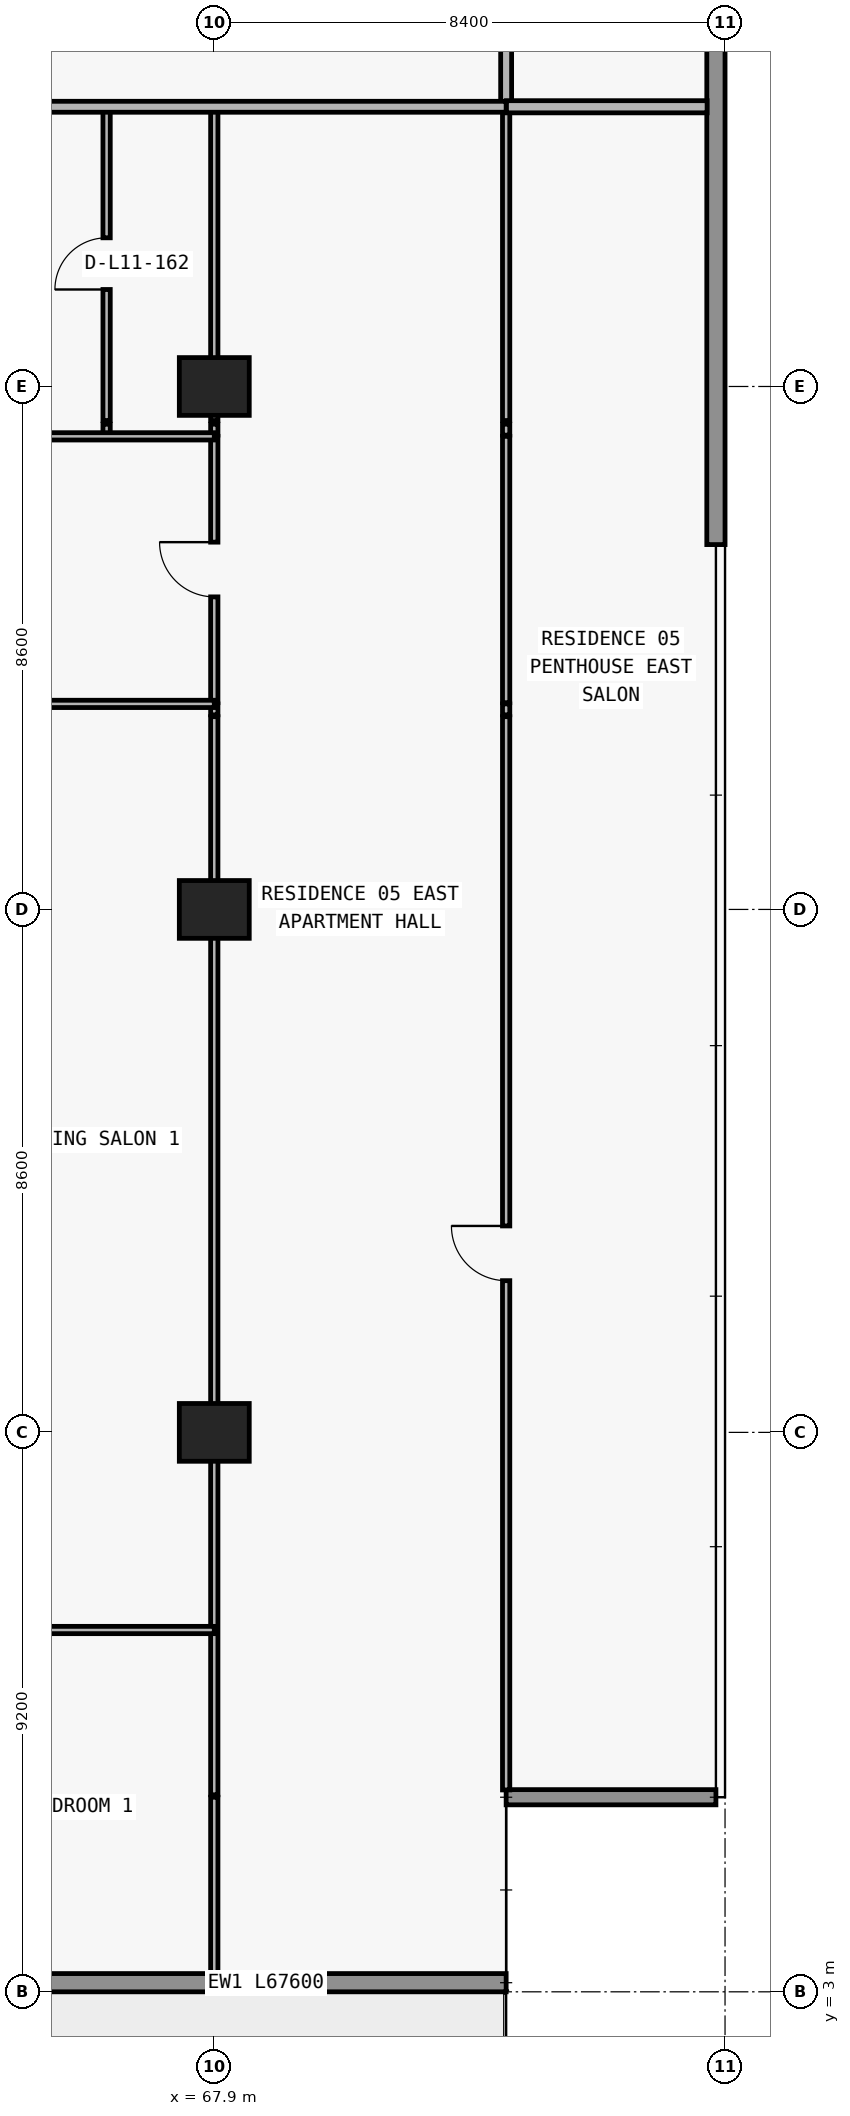
"""IFC4 building model, lengths in metres.
Left out: names, types, materials, properties, quantities, classifications, styles, units other than length and angle.
Written with IfcOpenShell. Run it as: python <this file> out.ifc"""

import sys

from ifc_helpers import new_model, si_unit, direction, frame, frame_2d, origin, origin_2d, place, context, subcontext, project, spatial, rectangle, extrude, element, fill, save


model = new_model("IFC4")
c1 = context("Model", 3, precision=1e-05, world=origin(), true_north=direction((0.0, 1.0)))
c2 = subcontext(c1, "Body", "Model", "MODEL_VIEW")
j1 = project(units=[si_unit("LENGTHUNIT", "METRE"), si_unit("PLANEANGLEUNIT", "RADIAN")], contexts=[c1])
p1 = place(None, origin())
s1 = spatial("IfcSite", under=j1, at=p1, CompositionType="ELEMENT")
p2 = place(p1, origin())
s2 = spatial("IfcBuilding", under=s1, at=p2, CompositionType="ELEMENT")
p3 = place(p2, frame((0.0, 0.0, 46.5)))
s3 = spatial("IfcBuildingStorey", under=s2, at=p3, CompositionType="ELEMENT", Elevation=46.5)
for number, where, z_axis, x_axis in (
    (1, (67.9, 12.2, 0.0), (0.0, 0.0, 1.0), (1.0, 0.0, 0.0)),
    (2, (67.9, 20.8, 0.0), (0.0, 0.0, 1.0), (1.0, 0.0, 0.0)),
    (3, (67.9, 29.4, 0.0), (0.0, 0.0, 1.0), (1.0, 0.0, 0.0)),
):
    element("IfcColumn", number, at=place(p3, frame(where, z_axis=z_axis, x_axis=x_axis)), inside=s3, PredefinedType="COLUMN", context=c2, shape_type="SweptSolid", body=[
        extrude(rectangle(XDim=1.15, YDim=0.95, at=origin_2d()), origin(), (0.0, 0.0, 1.0), 3.05),
    ])
p4 = place(p3, frame((72.7, 3.15, 0.0), z_axis=(0.0, 0.0, 1.0), x_axis=(-1.0, 0.0, 0.0)))
e4 = element("IfcWall", 4, at=p4, inside=s3, PredefinedType="STANDARD", context=c2, shape_type="SweptSolid", body=[
    extrude(rectangle(XDim=67.6, YDim=0.3, at=frame_2d((33.8, 0.0))), origin(), (0.0, 0.0, 1.0), 3.05),
])
p5 = place(p4, frame((59.89, 0.0, 0.0)))
e5 = element("IfcOpeningElement", 5, at=p5, cuts=e4, PredefinedType="OPENING", context=c2, shape_type="SweptSolid", body=[
    extrude(rectangle(XDim=2.0, YDim=2.3, at=frame_2d((1.0, 1.15))), frame((0.0, 0.16, 0.0), z_axis=(0.0, -1.0, 0.0), x_axis=(1.0, 0.0, 0.0)), (0.0, 0.0, 1.0), 0.32),
])
p6 = place(p4, frame((55.21, 0.0, 0.65)))
e6 = element("IfcOpeningElement", 6, at=p6, cuts=e4, PredefinedType="OPENING", context=c2, shape_type="SweptSolid", body=[
    extrude(rectangle(XDim=2.6, YDim=1.85, at=frame_2d((1.3, 0.925))), frame((0.0, 0.16, 0.0), z_axis=(0.0, -1.0, 0.0), x_axis=(1.0, 0.0, 0.0)), (0.0, 0.0, 1.0), 0.32),
])
p7 = place(p4, frame((49.1, 0.0, 0.85)))
e7 = element("IfcOpeningElement", 7, at=p7, cuts=e4, PredefinedType="OPENING", context=c2, shape_type="SweptSolid", body=[
    extrude(rectangle(XDim=2.2, YDim=1.55, at=frame_2d((1.1, 0.775))), frame((0.0, 0.16, 0.0), z_axis=(0.0, -1.0, 0.0), x_axis=(1.0, 0.0, 0.0)), (0.0, 0.0, 1.0), 0.32),
])
p8 = place(p4, frame((42.69, 0.0, 0.0)))
e8 = element("IfcOpeningElement", 8, at=p8, cuts=e4, PredefinedType="OPENING", context=c2, shape_type="SweptSolid", body=[
    extrude(rectangle(XDim=2.0, YDim=2.3, at=frame_2d((1.0, 1.15))), frame((0.0, 0.16, 0.0), z_axis=(0.0, -1.0, 0.0), x_axis=(1.0, 0.0, 0.0)), (0.0, 0.0, 1.0), 0.32),
])
p9 = place(p4, frame((38.59, 0.0, 0.85)))
e9 = element("IfcOpeningElement", 9, at=p9, cuts=e4, PredefinedType="OPENING", context=c2, shape_type="SweptSolid", body=[
    extrude(rectangle(XDim=1.8, YDim=1.55, at=frame_2d((0.9, 0.775))), frame((0.0, 0.16, 0.0), z_axis=(0.0, -1.0, 0.0), x_axis=(1.0, 0.0, 0.0)), (0.0, 0.0, 1.0), 0.32),
])
p10 = place(p4, frame((30.914, 0.0, 0.85)))
e10 = element("IfcOpeningElement", 10, at=p10, cuts=e4, PredefinedType="OPENING", context=c2, shape_type="SweptSolid", body=[
    extrude(rectangle(XDim=2.2, YDim=1.55, at=frame_2d((1.1, 0.775))), frame((0.0, 0.16, 0.0), z_axis=(0.0, -1.0, 0.0), x_axis=(1.0, 0.0, 0.0)), (0.0, 0.0, 1.0), 0.32),
])
p11 = place(p4, frame((26.69, 0.0, 0.0)))
e11 = element("IfcOpeningElement", 11, at=p11, cuts=e4, PredefinedType="OPENING", context=c2, shape_type="SweptSolid", body=[
    extrude(rectangle(XDim=2.0, YDim=2.3, at=frame_2d((1.0, 1.15))), frame((0.0, 0.16, 0.0), z_axis=(0.0, -1.0, 0.0), x_axis=(1.0, 0.0, 0.0)), (0.0, 0.0, 1.0), 0.32),
])
p12 = place(p4, frame((22.59, 0.0, 0.85)))
e12 = element("IfcOpeningElement", 12, at=p12, cuts=e4, PredefinedType="OPENING", context=c2, shape_type="SweptSolid", body=[
    extrude(rectangle(XDim=1.8, YDim=1.55, at=frame_2d((0.9, 0.775))), frame((0.0, 0.16, 0.0), z_axis=(0.0, -1.0, 0.0), x_axis=(1.0, 0.0, 0.0)), (0.0, 0.0, 1.0), 0.32),
])
p13 = place(p4, frame((18.69, 0.0, 0.0)))
e13 = element("IfcOpeningElement", 13, at=p13, cuts=e4, PredefinedType="OPENING", context=c2, shape_type="SweptSolid", body=[
    extrude(rectangle(XDim=2.0, YDim=2.3, at=frame_2d((1.0, 1.15))), frame((0.0, 0.16, 0.0), z_axis=(0.0, -1.0, 0.0), x_axis=(1.0, 0.0, 0.0)), (0.0, 0.0, 1.0), 0.32),
])
p14 = place(p4, frame((14.01, 0.0, 0.65)))
e14 = element("IfcOpeningElement", 14, at=p14, cuts=e4, PredefinedType="OPENING", context=c2, shape_type="SweptSolid", body=[
    extrude(rectangle(XDim=2.6, YDim=1.85, at=frame_2d((1.3, 0.925))), frame((0.0, 0.16, 0.0), z_axis=(0.0, -1.0, 0.0), x_axis=(1.0, 0.0, 0.0)), (0.0, 0.0, 1.0), 0.32),
])
p15 = place(p4, frame((7.9, 0.0, 0.85)))
e15 = element("IfcOpeningElement", 15, at=p15, cuts=e4, PredefinedType="OPENING", context=c2, shape_type="SweptSolid", body=[
    extrude(rectangle(XDim=2.2, YDim=1.55, at=frame_2d((1.1, 0.775))), frame((0.0, 0.16, 0.0), z_axis=(0.0, -1.0, 0.0), x_axis=(1.0, 0.0, 0.0)), (0.0, 0.0, 1.0), 0.32),
])
p16 = place(p3, frame((72.7, 6.2, 0.0), z_axis=(0.0, 0.0, 1.0), x_axis=(1.0, 0.0, 0.0)))
e16 = element("IfcWall", 16, at=p16, inside=s3, PredefinedType="ELEMENTEDWALL", context=c2, shape_type="SweptSolid", body=[
    extrude(rectangle(XDim=3.45, YDim=0.25, at=frame_2d((1.725, 0.0))), origin(), (0.0, 0.0, 1.0), 3.05),
])
p17 = place(p3, frame((76.15, 47.4, 0.0), z_axis=(0.0, 0.0, 1.0), x_axis=(0.0, -1.0, 0.0)))
e17 = element("IfcWall", 17, at=p17, inside=s3, PredefinedType="STANDARD", context=c2, shape_type="SweptSolid", body=[
    extrude(rectangle(XDim=20.6, YDim=0.3, at=frame_2d((10.3, 0.0))), origin(), (0.0, 0.0, 1.0), 3.05),
])
p18 = place(p3, frame((66.129, 28.6, 0.0), z_axis=(0.0, 0.0, 1.0), x_axis=(0.0, 1.0, 0.0)))
e18 = element("IfcWall", 18, at=p18, inside=s3, PredefinedType="PARTITIONING", context=c2, shape_type="SweptSolid", body=[
    extrude(rectangle(XDim=0.18, YDim=0.12, at=frame_2d((0.09, 0.0))), origin(), (0.0, 0.0, 1.0), 3.05),
])
p19 = place(p3, frame((66.129, 28.84, 0.0), z_axis=(0.0, 0.0, 1.0), x_axis=(0.0, 1.0, 0.0)))
e19 = element("IfcWall", 19, at=p19, inside=s3, PredefinedType="PARTITIONING", context=c2, shape_type="SweptSolid", body=[
    extrude(rectangle(XDim=5.16, YDim=0.12, at=frame_2d((2.58, 0.0))), origin(), (0.0, 0.0, 1.0), 3.05),
])
p20 = place(p19, frame((2.155, 0.0, 0.0)))
e20 = element("IfcOpeningElement", 20, at=p20, cuts=e19, PredefinedType="OPENING", context=c2, shape_type="SweptSolid", body=[
    extrude(rectangle(XDim=0.85, YDim=2.1, at=frame_2d((0.425, 1.05))), frame((0.0, 0.07, 0.0), z_axis=(0.0, -1.0, 0.0), x_axis=(1.0, 0.0, 0.0)), (0.0, 0.0, 1.0), 0.14),
])
p21 = place(p3, frame((67.9, 3.295, 0.0), z_axis=(0.0, 0.0, 1.0), x_axis=(0.0, 1.0, 0.0)))
e21 = element("IfcWall", 21, at=p21, inside=s3, PredefinedType="PARTITIONING", context=c2, shape_type="SweptSolid", body=[
    extrude(rectangle(XDim=2.905, YDim=0.12, at=frame_2d((1.453, 0.0))), origin(), (0.0, 0.0, 1.0), 3.05),
])
p22 = place(p3, frame((67.9, 6.24, 0.0), z_axis=(0.0, 0.0, 1.0), x_axis=(0.0, 1.0, 0.0)))
e22 = element("IfcWall", 22, at=p22, inside=s3, PredefinedType="PARTITIONING", context=c2, shape_type="SweptSolid", body=[
    extrude(rectangle(XDim=17.73, YDim=0.12, at=frame_2d((8.865, 0.0))), origin(), (0.0, 0.0, 1.0), 2.11),
])
p23 = place(p3, frame((67.9, 24.0, 0.0), z_axis=(0.0, 0.0, 1.0), x_axis=(0.0, 1.0, 0.0)))
e23 = element("IfcWall", 23, at=p23, inside=s3, PredefinedType="PARTITIONING", context=c2, shape_type="SweptSolid", body=[
    extrude(rectangle(XDim=0.18, YDim=0.12, at=frame_2d((0.09, 0.0))), origin(), (0.0, 0.0, 1.0), 2.11),
])
p24 = place(p3, frame((67.9, 24.2, 0.0), z_axis=(0.0, 0.0, 1.0), x_axis=(0.0, 1.0, 0.0)))
e24 = element("IfcWall", 24, at=p24, inside=s3, PredefinedType="PARTITIONING", context=c2, shape_type="SweptSolid", body=[
    extrude(rectangle(XDim=4.38, YDim=0.12, at=frame_2d((2.19, 0.0))), origin(), (0.0, 0.0, 1.0), 2.11),
])
p25 = place(p24, frame((1.74, 0.0, 0.0)))
e25 = element("IfcOpeningElement", 25, at=p25, cuts=e24, PredefinedType="OPENING", context=c2, shape_type="SweptSolid", body=[
    extrude(rectangle(XDim=0.9, YDim=2.06, at=frame_2d((0.45, 1.03))), frame((0.0, 0.07, 0.0), z_axis=(0.0, -1.0, 0.0), x_axis=(1.0, 0.0, 0.0)), (0.0, 0.0, 1.0), 0.14),
])
p26 = place(p3, frame((67.9, 28.6, 0.0), z_axis=(0.0, 0.0, 1.0), x_axis=(0.0, 1.0, 0.0)))
e26 = element("IfcWall", 26, at=p26, inside=s3, PredefinedType="PARTITIONING", context=c2, shape_type="SweptSolid", body=[
    extrude(rectangle(XDim=0.18, YDim=0.12, at=frame_2d((0.09, 0.0))), origin(), (0.0, 0.0, 1.0), 2.11),
])
p27 = place(p3, frame((67.9, 28.84, 0.0), z_axis=(0.0, 0.0, 1.0), x_axis=(0.0, 1.0, 0.0)))
e27 = element("IfcWall", 27, at=p27, inside=s3, PredefinedType="PARTITIONING", context=c2, shape_type="SweptSolid", body=[
    extrude(rectangle(XDim=5.16, YDim=0.12, at=frame_2d((2.58, 0.0))), origin(), (0.0, 0.0, 1.0), 2.11),
])
p28 = place(p3, frame((72.7, 6.32, 0.0), z_axis=(0.0, 0.0, 1.0), x_axis=(0.0, 1.0, 0.0)))
e28 = element("IfcWall", 28, at=p28, inside=s3, PredefinedType="PARTITIONING", context=c2, shape_type="SweptSolid", body=[
    extrude(rectangle(XDim=17.65, YDim=0.12, at=frame_2d((8.825, 0.0))), origin(), (0.0, 0.0, 1.0), 3.05),
])
p29 = place(p28, frame((8.375, 0.0, 0.0)))
e29 = element("IfcOpeningElement", 29, at=p29, cuts=e28, PredefinedType="OPENING", context=c2, shape_type="SweptSolid", body=[
    extrude(rectangle(XDim=0.9, YDim=2.15, at=frame_2d((0.45, 1.075))), frame((0.0, 0.07, 0.0), z_axis=(0.0, -1.0, 0.0), x_axis=(1.0, 0.0, 0.0)), (0.0, 0.0, 1.0), 0.14),
])
p30 = place(p3, frame((72.7, 24.0, 0.0), z_axis=(0.0, 0.0, 1.0), x_axis=(0.0, 1.0, 0.0)))
e30 = element("IfcWall", 30, at=p30, inside=s3, PredefinedType="PARTITIONING", context=c2, shape_type="SweptSolid", body=[
    extrude(rectangle(XDim=0.18, YDim=0.12, at=frame_2d((0.09, 0.0))), origin(), (0.0, 0.0, 1.0), 3.05),
])
p31 = place(p3, frame((72.7, 24.2, 0.0), z_axis=(0.0, 0.0, 1.0), x_axis=(0.0, 1.0, 0.0)))
e31 = element("IfcWall", 31, at=p31, inside=s3, PredefinedType="PARTITIONING", context=c2, shape_type="SweptSolid", body=[
    extrude(rectangle(XDim=4.38, YDim=0.12, at=frame_2d((2.19, 0.0))), origin(), (0.0, 0.0, 1.0), 3.05),
])
p32 = place(p3, frame((72.7, 28.6, 0.0), z_axis=(0.0, 0.0, 1.0), x_axis=(0.0, 1.0, 0.0)))
e32 = element("IfcWall", 32, at=p32, inside=s3, PredefinedType="PARTITIONING", context=c2, shape_type="SweptSolid", body=[
    extrude(rectangle(XDim=0.18, YDim=0.12, at=frame_2d((0.09, 0.0))), origin(), (0.0, 0.0, 1.0), 3.05),
])
p33 = place(p3, frame((72.7, 28.84, 0.0), z_axis=(0.0, 0.0, 1.0), x_axis=(0.0, 1.0, 0.0)))
e33 = element("IfcWall", 33, at=p33, inside=s3, PredefinedType="PARTITIONING", context=c2, shape_type="SweptSolid", body=[
    extrude(rectangle(XDim=5.16, YDim=0.12, at=frame_2d((2.58, 0.0))), origin(), (0.0, 0.0, 1.0), 3.05),
])
p34 = place(p3, frame((72.7, 34.005, 0.0), z_axis=(0.0, 0.0, 1.0), x_axis=(0.0, 1.0, 0.0)))
e34 = element("IfcWall", 34, at=p34, inside=s3, PredefinedType="PARTITIONING", context=c2, shape_type="SweptSolid", body=[
    extrude(rectangle(XDim=2.895, YDim=0.18, at=frame_2d((1.448, 0.0))), origin(), (0.0, 0.0, 1.0), 3.05),
])
p35 = place(p3, frame((59.5, 8.95, 0.0), z_axis=(0.0, 0.0, 1.0), x_axis=(1.0, 0.0, 0.0)))
e35 = element("IfcWall", 35, at=p35, inside=s3, PredefinedType="PARTITIONING", context=c2, shape_type="SweptSolid", body=[
    extrude(rectangle(XDim=8.4, YDim=0.12, at=frame_2d((4.2, 0.0))), origin(), (0.0, 0.0, 1.0), 3.05),
])
p36 = place(p35, frame((3.75, 0.0, 0.0)))
e36 = element("IfcOpeningElement", 36, at=p36, cuts=e35, PredefinedType="OPENING", context=c2, shape_type="SweptSolid", body=[
    extrude(rectangle(XDim=0.9, YDim=2.15, at=frame_2d((0.45, 1.075))), frame((0.0, 0.07, 0.0), z_axis=(0.0, -1.0, 0.0), x_axis=(1.0, 0.0, 0.0)), (0.0, 0.0, 1.0), 0.14),
])
p37 = place(p3, frame((59.505, 24.18, 0.0), z_axis=(0.0, 0.0, 1.0), x_axis=(1.0, 0.0, 0.0)))
e37 = element("IfcWall", 37, at=p37, inside=s3, PredefinedType="PARTITIONING", context=c2, shape_type="SweptSolid", body=[
    extrude(rectangle(XDim=8.395, YDim=0.12, at=frame_2d((4.198, 0.0))), origin(), (0.0, 0.0, 1.0), 3.05),
])
p38 = place(p37, frame((3.748, 0.0, 0.0)))
e38 = element("IfcOpeningElement", 38, at=p38, cuts=e37, PredefinedType="OPENING", context=c2, shape_type="SweptSolid", body=[
    extrude(rectangle(XDim=0.9, YDim=2.15, at=frame_2d((0.45, 1.075))), frame((0.0, 0.07, 0.0), z_axis=(0.0, -1.0, 0.0), x_axis=(1.0, 0.0, 0.0)), (0.0, 0.0, 1.0), 0.14),
])
p39 = place(p3, frame((59.5, 28.58, 0.0), z_axis=(0.0, 0.0, 1.0), x_axis=(1.0, 0.0, 0.0)))
e39 = element("IfcWall", 39, at=p39, inside=s3, PredefinedType="PARTITIONING", context=c2, shape_type="SweptSolid", body=[
    extrude(rectangle(XDim=8.4, YDim=0.12, at=frame_2d((4.2, 0.0))), origin(), (0.0, 0.0, 1.0), 3.05),
])
p40 = place(p39, frame((2.865, 0.0, 0.0)))
e40 = element("IfcOpeningElement", 40, at=p40, cuts=e39, PredefinedType="OPENING", context=c2, shape_type="SweptSolid", body=[
    extrude(rectangle(XDim=0.9, YDim=2.15, at=frame_2d((0.45, 1.075))), frame((0.0, 0.07, 0.0), z_axis=(0.0, -1.0, 0.0), x_axis=(1.0, 0.0, 0.0)), (0.0, 0.0, 1.0), 0.14),
])
p41 = place(p3, frame((31.4, 34.0, 0.0), z_axis=(0.0, 0.0, 1.0), x_axis=(1.0, 0.0, 0.0)))
e41 = element("IfcWall", 41, at=p41, inside=s3, PredefinedType="PARTITIONING", context=c2, shape_type="SweptSolid", body=[
    extrude(rectangle(XDim=41.3, YDim=0.18, at=frame_2d((20.65, 0.0))), origin(), (0.0, 0.0, 1.0), 3.05),
])
p42 = place(p41, frame((6.07, 0.0, 0.0)))
e42 = element("IfcOpeningElement", 42, at=p42, cuts=e41, PredefinedType="OPENING", context=c2, shape_type="SweptSolid", body=[
    extrude(rectangle(XDim=1.0, YDim=2.2, at=frame_2d((0.5, 1.1))), frame((0.0, 0.1, 0.0), z_axis=(0.0, -1.0, 0.0), x_axis=(1.0, 0.0, 0.0)), (0.0, 0.0, 1.0), 0.2),
])
p43 = place(p41, frame((13.945, 0.0, 0.0)))
e43 = element("IfcOpeningElement", 43, at=p43, cuts=e41, PredefinedType="OPENING", context=c2, shape_type="SweptSolid", body=[
    extrude(rectangle(XDim=1.0, YDim=2.2, at=frame_2d((0.5, 1.1))), frame((0.0, 0.1, 0.0), z_axis=(0.0, -1.0, 0.0), x_axis=(1.0, 0.0, 0.0)), (0.0, 0.0, 1.0), 0.2),
])
p44 = place(p41, frame((22.414, 0.0, 0.0)))
e44 = element("IfcOpeningElement", 44, at=p44, cuts=e41, PredefinedType="OPENING", context=c2, shape_type="SweptSolid", body=[
    extrude(rectangle(XDim=1.0, YDim=2.2, at=frame_2d((0.5, 1.1))), frame((0.0, 0.1, 0.0), z_axis=(0.0, -1.0, 0.0), x_axis=(1.0, 0.0, 0.0)), (0.0, 0.0, 1.0), 0.2),
])
p45 = place(p3, frame((72.705, 34.0, 0.0), z_axis=(0.0, 0.0, 1.0), x_axis=(1.0, 0.0, 0.0)))
e45 = element("IfcWall", 45, at=p45, inside=s3, PredefinedType="PARTITIONING", context=c2, shape_type="SweptSolid", body=[
    extrude(rectangle(XDim=3.3, YDim=0.2, at=frame_2d((1.65, 0.0))), origin(), (0.0, 0.0, 1.0), 3.05),
])
p46 = place(p20, origin())
e46 = element("IfcDoor", 46, at=p46, inside=s3, OperationType="SINGLE_SWING_LEFT", PredefinedType="DOOR", context=c2, shape_type="SweptSolid", body=[
    extrude(rectangle(XDim=0.85, YDim=2.1, at=frame_2d((0.425, 1.05))), frame((0.0, 0.025, 0.0), z_axis=(0.0, -1.0, 0.0), x_axis=(1.0, 0.0, 0.0)), (0.0, 0.0, 1.0), 0.05),
])
fill(e20, e46)
p47 = place(p25, origin())
e47 = element("IfcDoor", 47, at=p47, inside=s3, OperationType="SINGLE_SWING_RIGHT", PredefinedType="DOOR", context=c2, shape_type="SweptSolid", body=[
    extrude(rectangle(XDim=0.9, YDim=2.06, at=frame_2d((0.45, 1.03))), frame((0.0, 0.025, 0.0), z_axis=(0.0, -1.0, 0.0), x_axis=(1.0, 0.0, 0.0)), (0.0, 0.0, 1.0), 0.05),
])
fill(e25, e47)
p48 = place(p29, origin())
e48 = element("IfcDoor", 48, at=p48, inside=s3, OperationType="SINGLE_SWING_RIGHT", PredefinedType="DOOR", context=c2, shape_type="SweptSolid", body=[
    extrude(rectangle(XDim=0.9, YDim=2.15, at=frame_2d((0.45, 1.075))), frame((0.0, 0.025, 0.0), z_axis=(0.0, -1.0, 0.0), x_axis=(1.0, 0.0, 0.0)), (0.0, 0.0, 1.0), 0.05),
])
fill(e29, e48)
save(model, sys.argv[1])
